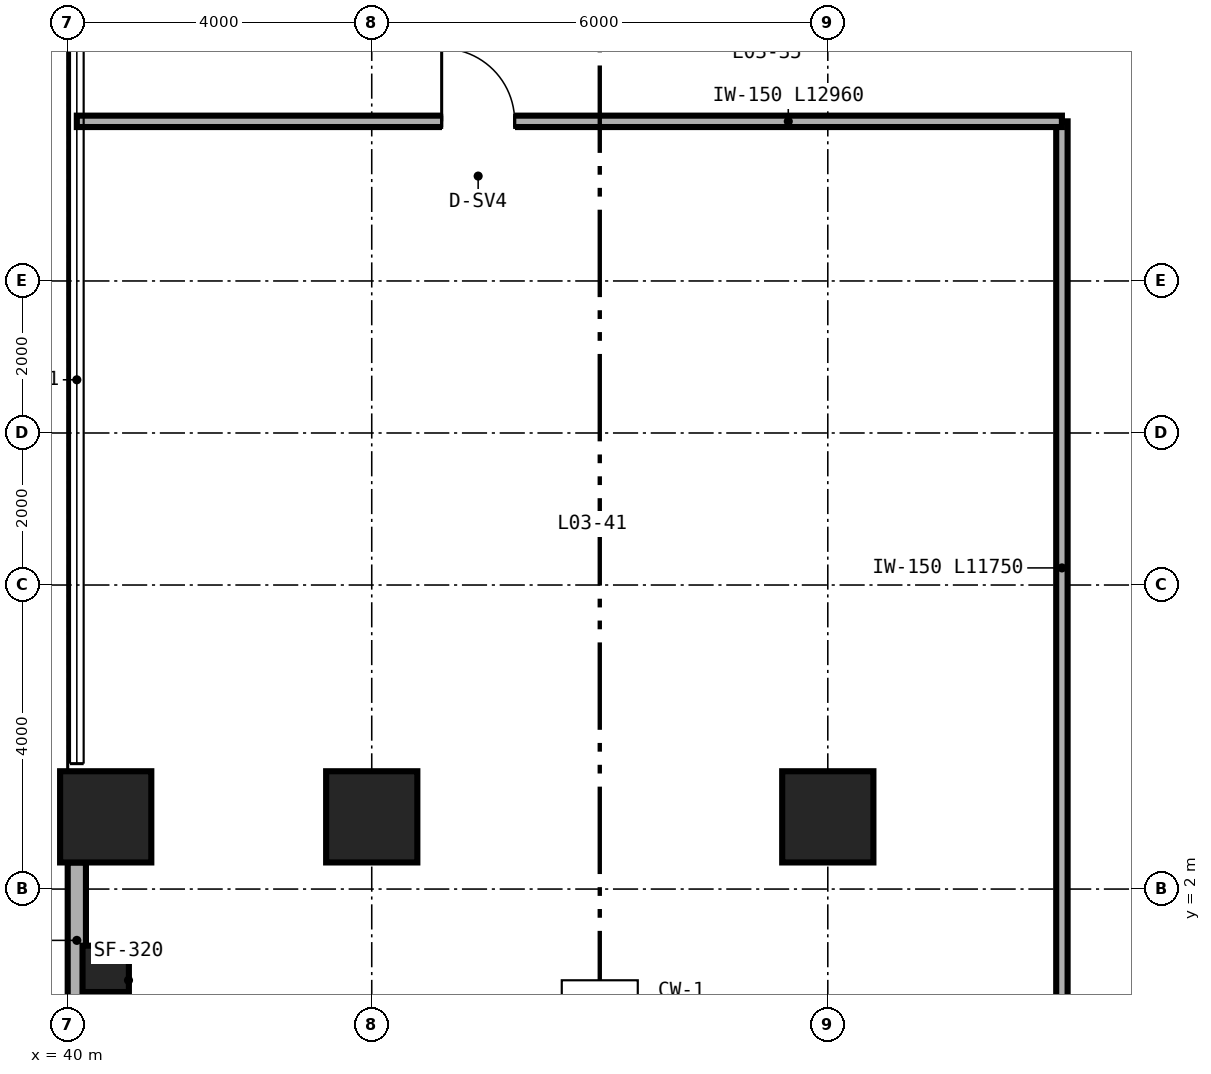
"""IFC4 building model, lengths in metres.
Left out: names, types, materials, properties, quantities, classifications, styles, units other than length and angle.
Written with IfcOpenShell. Run it as: python <this file> out.ifc"""

import sys

from ifc_helpers import new_model, si_unit, direction, frame, frame_2d, origin, origin_2d, place, context, subcontext, project, spatial, rectangle, hollow_circle, extrude, source, transform, mapped, element, fill, save


model = new_model("IFC4")
c1 = context("Model", 3, precision=1e-05, world=origin(), true_north=direction((0.0, 1.0)))
c2 = subcontext(c1, "Body", "Model", "MODEL_VIEW")
j1 = project(units=[si_unit("LENGTHUNIT", "METRE"), si_unit("PLANEANGLEUNIT", "RADIAN")], contexts=[c1])
p1 = place(None, origin())
s1 = spatial("IfcSite", under=j1, at=p1, CompositionType="ELEMENT")
p2 = place(p1, origin())
s2 = spatial("IfcBuilding", under=s1, at=p2, CompositionType="ELEMENT")
p3 = place(p2, frame((0.0, 0.0, 11.4)))
s3 = spatial("IfcBuildingStorey", under=s2, at=p3, CompositionType="ELEMENT", Elevation=11.4)
m1 = source(origin(), c2, "Body", "SweptSolid", [
    extrude(hollow_circle(Radius=0.305, WallThickness=0.025, at=origin_2d()), origin(), (0.0, 0.0, 1.0), 7.51),
])
p4 = place(p3, frame((40.5, 0.95, 0.0), z_axis=(0.0, 0.0, 1.0), x_axis=(1.0, 0.0, 0.0)))
e1 = element("IfcColumn", 1, at=p4, inside=s3, PredefinedType="COLUMN", context=c2, shape_type="MappedRepresentation", body=[
    mapped(m1, transform((0.0, 0.0, 0.0), scale=1.0)),
])
m2 = source(origin(), c2, "Body", "SweptSolid", [
    extrude(rectangle(XDim=1.2, YDim=1.2, at=origin_2d()), origin(), (0.0, 0.0, 1.0), 7.51),
])
for number, where, z_axis, x_axis in (
    (2, (40.5, 2.95, 0.0), (0.0, 0.0, 1.0), (1.0, 0.0, 0.0)),
    (3, (44.0, 2.95, 0.0), (0.0, 0.0, 1.0), (1.0, 0.0, 0.0)),
    (4, (50.0, 2.95, 0.0), (0.0, 0.0, 1.0), (1.0, 0.0, 0.0)),
):
    element("IfcColumn", number, at=place(p3, frame(where, z_axis=z_axis, x_axis=x_axis)), inside=s3, PredefinedType="COLUMN", context=c2, shape_type="MappedRepresentation", body=[
        mapped(m2, transform((0.0, 0.0, 0.0), scale=1.0)),
    ])
p5 = place(p3, frame((40.12, 0.3, 0.0), z_axis=(0.0, 0.0, 1.0), x_axis=(0.0, 1.0, 0.0)))
e5 = element("IfcWall", 5, at=p5, inside=s3, PredefinedType="SOLIDWALL", context=c2, shape_type="SweptSolid", body=[
    extrude(rectangle(XDim=2.05, YDim=0.24, at=frame_2d((1.025, 0.0))), origin(), (0.0, 0.0, 1.0), 6.583),
])
p6 = place(p3, frame((53.08, 0.35, 0.0), z_axis=(0.0, 0.0, 1.0), x_axis=(0.0, 1.0, 0.0)))
e6 = element("IfcWall", 6, at=p6, inside=s3, PredefinedType="PARTITIONING", context=c2, shape_type="SweptSolid", body=[
    extrude(rectangle(XDim=11.75, YDim=0.15, at=frame_2d((5.875, 0.0))), origin(), (0.0, 0.0, 1.0), 6.583),
])
p7 = place(p3, frame((40.12, 12.1, 0.0), z_axis=(0.0, 0.0, 1.0), x_axis=(1.0, 0.0, 0.0)))
e7 = element("IfcWall", 7, at=p7, inside=s3, PredefinedType="PARTITIONING", context=c2, shape_type="SweptSolid", body=[
    extrude(rectangle(XDim=12.96, YDim=0.15, at=frame_2d((6.48, 0.0))), origin(), (0.0, 0.0, 1.0), 6.731),
])
p8 = place(p7, frame((4.8, 0.0, 0.0)))
e8 = element("IfcOpeningElement", 8, at=p8, cuts=e7, PredefinedType="OPENING", context=c2, shape_type="SweptSolid", body=[
    extrude(rectangle(XDim=0.96, YDim=2.15, at=frame_2d((0.48, 1.075))), frame((0.0, 0.085, 0.0), z_axis=(0.0, -1.0, 0.0), x_axis=(1.0, 0.0, 0.0)), (0.0, 0.0, 1.0), 0.17),
])
m3 = source(origin(), c2, "Body", "SweptSolid", [
    extrude(rectangle(XDim=0.96, YDim=2.15, at=frame_2d((0.48, 1.075))), frame((0.0, 0.025, 0.0), z_axis=(0.0, -1.0, 0.0), x_axis=(1.0, 0.0, 0.0)), (0.0, 0.0, 1.0), 0.05),
])
p9 = place(p8, origin())
e9 = element("IfcDoor", 9, at=p9, inside=s3, OperationType="SINGLE_SWING_LEFT", PredefinedType="DOOR", context=c2, shape_type="MappedRepresentation", body=[
    mapped(m3, transform((0.0, 0.0, 0.0), scale=1.0)),
])
fill(e8, e9)
save(model, sys.argv[1])
